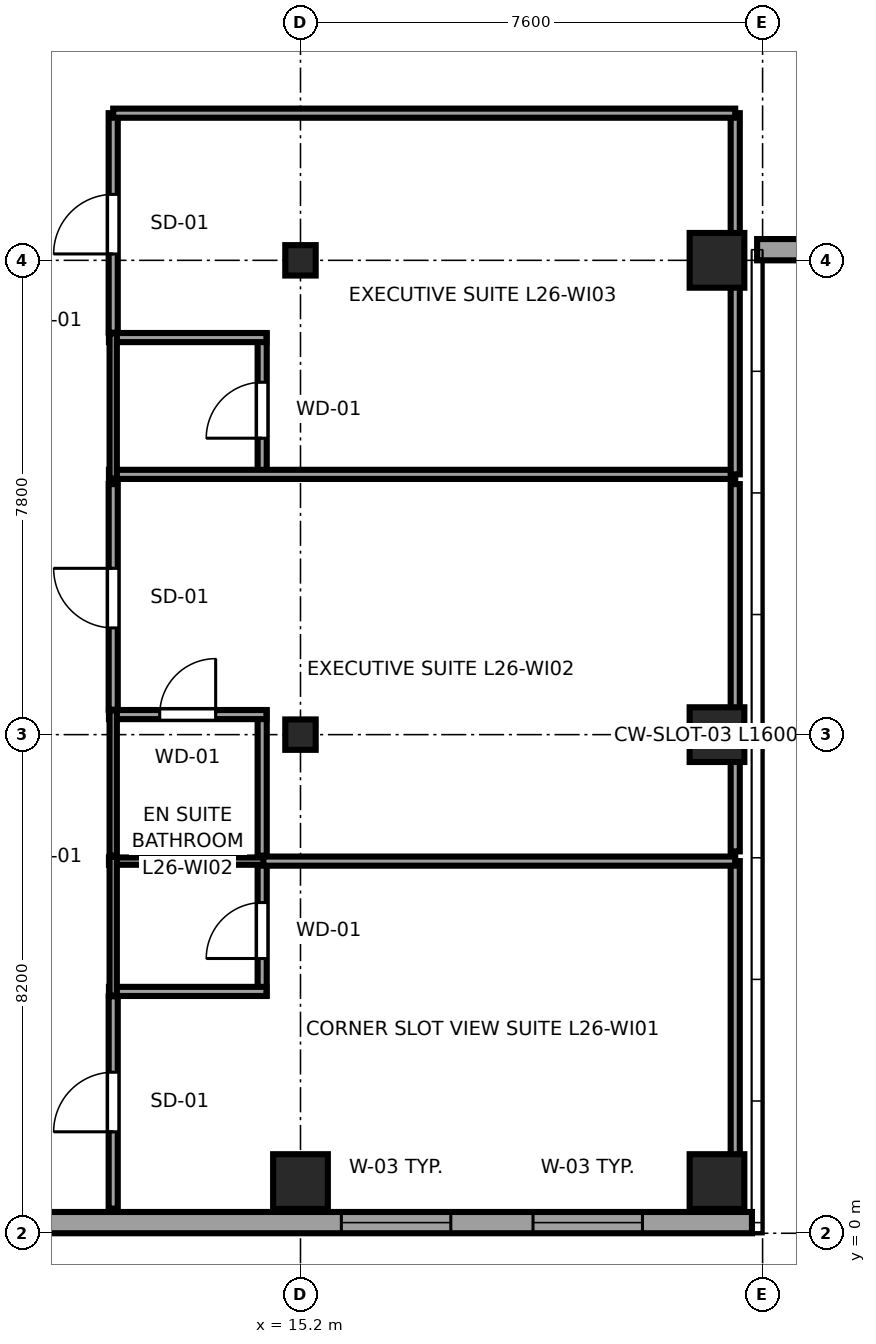
"""IFC4 building model, lengths in metres.
Left out: names, types, materials, properties, quantities, classifications, styles, units other than length and angle.
Written with IfcOpenShell. Run it as: python <this file> out.ifc"""

import sys

from ifc_helpers import new_model, si_unit, direction, frame, frame_2d, origin, origin_2d, place, context, subcontext, project, spatial, rectangle, i_section, extrude, source, transform, mapped, element, fill, save


model = new_model("IFC4")
c1 = context("Model", 3, precision=1e-05, world=origin(), true_north=direction((0.0, 1.0)))
c2 = subcontext(c1, "Body", "Model", "MODEL_VIEW")
j1 = project(units=[si_unit("LENGTHUNIT", "METRE"), si_unit("PLANEANGLEUNIT", "RADIAN")], contexts=[c1])
p1 = place(None, origin())
s1 = spatial("IfcSite", under=j1, at=p1, CompositionType="ELEMENT")
p2 = place(p1, origin())
s2 = spatial("IfcBuilding", under=s1, at=p2, CompositionType="ELEMENT")
p3 = place(p2, frame((0.0, 0.0, 104.45)))
s3 = spatial("IfcBuildingStorey", under=s2, at=p3, CompositionType="ELEMENT", Elevation=104.45)
m1 = source(origin(), c2, "Body", "SweptSolid", [
    extrude(rectangle(XDim=0.9, YDim=0.9, at=origin_2d()), origin(), (0.0, 0.0, 1.0), 3.55),
])
p4 = place(p3, frame((15.2, 0.85, 0.0), z_axis=(0.0, 0.0, 1.0), x_axis=(1.0, 0.0, 0.0)))
e1 = element("IfcColumn", 1, at=p4, inside=s3, PredefinedType="COLUMN", context=c2, shape_type="MappedRepresentation", body=[
    mapped(m1, transform((0.0, 0.0, 0.0), x_axis=(1.0, 0.0, 0.0), y_axis=(0.0, 1.0, 0.0), z_axis=(0.0, 0.0, 1.0), scale=1.0)),
])
m2 = source(origin(), c2, "Body", "SweptSolid", [
    extrude(i_section(OverallWidth=0.5, OverallDepth=0.5, WebThickness=0.022, FlangeThickness=0.034, at=origin_2d()), origin(), (0.0, 0.0, 1.0), 3.55),
])
for number, where, z_axis, x_axis in (
    (2, (15.2, 8.2, 0.0), (0.0, 0.0, 1.0), (1.0, 0.0, 0.0)),
    (3, (15.2, 16.0, 0.0), (0.0, 0.0, 1.0), (1.0, 0.0, 0.0)),
):
    element("IfcColumn", number, at=place(p3, frame(where, z_axis=z_axis, x_axis=x_axis)), inside=s3, PredefinedType="COLUMN", context=c2, shape_type="MappedRepresentation", body=[
        mapped(m2, transform((0.0, 0.0, 0.0), x_axis=(1.0, 0.0, 0.0), y_axis=(0.0, 1.0, 0.0), z_axis=(0.0, 0.0, 1.0), scale=1.0)),
    ])
for number, where, z_axis, x_axis in (
    (4, (22.05, 0.85, 0.0), (0.0, 0.0, 1.0), (1.0, 0.0, 0.0)),
    (5, (22.05, 8.2, 0.0), (0.0, 0.0, 1.0), (1.0, 0.0, 0.0)),
    (6, (22.05, 16.0, 0.0), (0.0, 0.0, 1.0), (1.0, 0.0, 0.0)),
):
    element("IfcColumn", number, at=place(p3, frame(where, z_axis=z_axis, x_axis=x_axis)), inside=s3, PredefinedType="COLUMN", context=c2, shape_type="MappedRepresentation", body=[
        mapped(m1, transform((0.0, 0.0, 0.0), x_axis=(1.0, 0.0, 0.0), y_axis=(0.0, 1.0, 0.0), z_axis=(0.0, 0.0, 1.0), scale=1.0)),
    ])
p5 = place(p3, frame((4.617, 0.175, 0.0), z_axis=(0.0, 0.0, 1.0), x_axis=(1.0, 0.0, 0.0)))
e7 = element("IfcWall", 7, at=p5, inside=s3, PredefinedType="SOLIDWALL", context=c2, shape_type="SweptSolid", body=[
    extrude(rectangle(XDim=18.008, YDim=0.35, at=frame_2d((9.004, 0.0))), origin(), (0.0, 0.0, 1.0), 3.37),
])
p6 = place(p5, frame((11.255, 0.0, 0.68)))
e8 = element("IfcOpeningElement", 8, at=p6, cuts=e7, PredefinedType="OPENING", context=c2, shape_type="SweptSolid", body=[
    extrude(rectangle(XDim=1.8, YDim=1.85, at=frame_2d((0.9, 0.925))), frame((0.0, 0.185, 0.0), z_axis=(0.0, -1.0, 0.0), x_axis=(1.0, 0.0, 0.0)), (0.0, 0.0, 1.0), 0.37),
])
p7 = place(p5, frame((14.407, 0.0, 0.68)))
e9 = element("IfcOpeningElement", 9, at=p7, cuts=e7, PredefinedType="OPENING", context=c2, shape_type="SweptSolid", body=[
    extrude(rectangle(XDim=1.8, YDim=1.85, at=frame_2d((0.9, 0.925))), frame((0.0, 0.185, 0.0), z_axis=(0.0, -1.0, 0.0), x_axis=(1.0, 0.0, 0.0)), (0.0, 0.0, 1.0), 0.37),
])
p8 = place(p3, frame((22.71, 16.175, 0.0), z_axis=(0.0, 0.0, 1.0), x_axis=(1.0, 0.0, 0.0)))
e10 = element("IfcWall", 10, at=p8, inside=s3, PredefinedType="SOLIDWALL", context=c2, shape_type="SweptSolid", body=[
    extrude(rectangle(XDim=11.58, YDim=0.35, at=frame_2d((5.79, 0.0))), origin(), (0.0, 0.0, 1.0), 2.748),
])
p9 = place(p8, frame((2.295, 0.0, 0.68)))
e11 = element("IfcOpeningElement", 11, at=p9, cuts=e10, PredefinedType="OPENING", context=c2, shape_type="SweptSolid", body=[
    extrude(rectangle(XDim=1.8, YDim=1.85, at=frame_2d((0.9, 0.925))), frame((0.0, 0.185, 0.0), z_axis=(0.0, -1.0, 0.0), x_axis=(1.0, 0.0, 0.0)), (0.0, 0.0, 1.0), 0.37),
])
p10 = place(p8, frame((7.485, 0.0, 0.68)))
e12 = element("IfcOpeningElement", 12, at=p10, cuts=e10, PredefinedType="OPENING", context=c2, shape_type="SweptSolid", body=[
    extrude(rectangle(XDim=1.8, YDim=1.85, at=frame_2d((0.9, 0.925))), frame((0.0, 0.185, 0.0), z_axis=(0.0, -1.0, 0.0), x_axis=(1.0, 0.0, 0.0)), (0.0, 0.0, 1.0), 0.37),
])
p11 = place(p3, frame((14.57, 3.907, 0.0), z_axis=(0.0, 0.0, 1.0), x_axis=(0.0, 1.0, 0.0)))
e13 = element("IfcWall", 13, at=p11, inside=s3, PredefinedType="PARTITIONING", context=c2, shape_type="SweptSolid", body=[
    extrude(rectangle(XDim=2.283, YDim=0.15, at=frame_2d((1.142, 0.0))), origin(), (0.0, 0.0, 1.0), 3.37),
])
p12 = place(p11, frame((0.612, 0.0, 0.0)))
e14 = element("IfcOpeningElement", 14, at=p12, cuts=e13, PredefinedType="OPENING", context=c2, shape_type="SweptSolid", body=[
    extrude(rectangle(XDim=0.92, YDim=2.01, at=frame_2d((0.46, 1.005))), frame((0.0, 0.085, 0.0), z_axis=(0.0, -1.0, 0.0), x_axis=(1.0, 0.0, 0.0)), (0.0, 0.0, 1.0), 0.17),
])
p13 = place(p3, frame((12.05, 3.977, 0.0), z_axis=(0.0, 0.0, 1.0), x_axis=(1.0, 0.0, 0.0)))
e15 = element("IfcWall", 15, at=p13, inside=s3, PredefinedType="PARTITIONING", context=c2, shape_type="SweptSolid", body=[
    extrude(rectangle(XDim=2.59, YDim=0.15, at=frame_2d((1.295, 0.0))), origin(), (0.0, 0.0, 1.0), 3.37),
])
p14 = place(p3, frame((12.05, 6.12, 0.0), z_axis=(0.0, 0.0, 1.0), x_axis=(1.0, 0.0, 0.0)))
e16 = element("IfcWall", 16, at=p14, inside=s3, PredefinedType="PLUMBINGWALL", context=c2, shape_type="SweptSolid", body=[
    extrude(rectangle(XDim=2.59, YDim=0.12, at=frame_2d((1.295, 0.0))), origin(), (0.0, 0.0, 1.0), 3.37),
])
p15 = place(p3, frame((12.12, 3.907, 0.0), z_axis=(0.0, 0.0, 1.0), x_axis=(0.0, 1.0, 0.0)))
e17 = element("IfcWall", 17, at=p15, inside=s3, PredefinedType="PLUMBINGWALL", context=c2, shape_type="SweptSolid", body=[
    extrude(rectangle(XDim=2.283, YDim=0.12, at=frame_2d((1.142, 0.0))), origin(), (0.0, 0.0, 1.0), 3.37),
])
p16 = place(p3, frame((14.57, 6.21, 0.0), z_axis=(0.0, 0.0, 1.0), x_axis=(0.0, 1.0, 0.0)))
e18 = element("IfcWall", 18, at=p16, inside=s3, PredefinedType="PARTITIONING", context=c2, shape_type="SweptSolid", body=[
    extrude(rectangle(XDim=2.39, YDim=0.15, at=frame_2d((1.195, 0.0))), origin(), (0.0, 0.0, 1.0), 3.37),
])
p17 = place(p3, frame((12.05, 8.53, 0.0), z_axis=(0.0, 0.0, 1.0), x_axis=(1.0, 0.0, 0.0)))
e19 = element("IfcWall", 19, at=p17, inside=s3, PredefinedType="PARTITIONING", context=c2, shape_type="SweptSolid", body=[
    extrude(rectangle(XDim=2.59, YDim=0.15, at=frame_2d((1.295, 0.0))), origin(), (0.0, 0.0, 1.0), 3.37),
])
p18 = place(p17, frame((0.835, 0.0, 0.0)))
e20 = element("IfcOpeningElement", 20, at=p18, cuts=e19, PredefinedType="OPENING", context=c2, shape_type="SweptSolid", body=[
    extrude(rectangle(XDim=0.92, YDim=2.01, at=frame_2d((0.46, 1.005))), frame((0.0, 0.085, 0.0), z_axis=(0.0, -1.0, 0.0), x_axis=(1.0, 0.0, 0.0)), (0.0, 0.0, 1.0), 0.17),
])
p19 = place(p3, frame((12.12, 6.21, 0.0), z_axis=(0.0, 0.0, 1.0), x_axis=(0.0, 1.0, 0.0)))
e21 = element("IfcWall", 21, at=p19, inside=s3, PredefinedType="PLUMBINGWALL", context=c2, shape_type="SweptSolid", body=[
    extrude(rectangle(XDim=2.39, YDim=0.12, at=frame_2d((1.195, 0.0))), origin(), (0.0, 0.0, 1.0), 3.37),
])
p20 = place(p3, frame((14.57, 12.41, 0.0), z_axis=(0.0, 0.0, 1.0), x_axis=(0.0, 1.0, 0.0)))
e22 = element("IfcWall", 22, at=p20, inside=s3, PredefinedType="PARTITIONING", context=c2, shape_type="SweptSolid", body=[
    extrude(rectangle(XDim=2.39, YDim=0.15, at=frame_2d((1.195, 0.0))), origin(), (0.0, 0.0, 1.0), 3.37),
])
p21 = place(p20, frame((0.665, 0.0, 0.0)))
e23 = element("IfcOpeningElement", 23, at=p21, cuts=e22, PredefinedType="OPENING", context=c2, shape_type="SweptSolid", body=[
    extrude(rectangle(XDim=0.92, YDim=2.01, at=frame_2d((0.46, 1.005))), frame((0.0, 0.085, 0.0), z_axis=(0.0, -1.0, 0.0), x_axis=(1.0, 0.0, 0.0)), (0.0, 0.0, 1.0), 0.17),
])
p22 = place(p3, frame((12.05, 12.48, 0.0), z_axis=(0.0, 0.0, 1.0), x_axis=(1.0, 0.0, 0.0)))
e24 = element("IfcWall", 24, at=p22, inside=s3, PredefinedType="PARTITIONING", context=c2, shape_type="SweptSolid", body=[
    extrude(rectangle(XDim=10.3, YDim=0.15, at=frame_2d((5.15, 0.0))), origin(), (0.0, 0.0, 1.0), 3.37),
])
p23 = place(p3, frame((12.05, 14.73, 0.0), z_axis=(0.0, 0.0, 1.0), x_axis=(1.0, 0.0, 0.0)))
e25 = element("IfcWall", 25, at=p23, inside=s3, PredefinedType="PARTITIONING", context=c2, shape_type="SweptSolid", body=[
    extrude(rectangle(XDim=2.59, YDim=0.15, at=frame_2d((1.295, 0.0))), origin(), (0.0, 0.0, 1.0), 3.37),
])
p24 = place(p3, frame((12.12, 12.41, 0.0), z_axis=(0.0, 0.0, 1.0), x_axis=(0.0, 1.0, 0.0)))
e26 = element("IfcWall", 26, at=p24, inside=s3, PredefinedType="PLUMBINGWALL", context=c2, shape_type="SweptSolid", body=[
    extrude(rectangle(XDim=2.39, YDim=0.12, at=frame_2d((1.195, 0.0))), origin(), (0.0, 0.0, 1.0), 3.37),
])
p25 = place(p3, frame((12.12, 0.405, 0.0), z_axis=(0.0, 0.0, 1.0), x_axis=(0.0, 1.0, 0.0)))
e27 = element("IfcWall", 27, at=p25, inside=s3, PredefinedType="PARTITIONING", context=c2, shape_type="SweptSolid", body=[
    extrude(rectangle(XDim=3.492, YDim=0.15, at=frame_2d((1.746, 0.0))), origin(), (0.0, 0.0, 1.0), 3.37),
])
p26 = place(p25, frame((1.263, 0.0, 0.0)))
e28 = element("IfcOpeningElement", 28, at=p26, cuts=e27, PredefinedType="OPENING", context=c2, shape_type="SweptSolid", body=[
    extrude(rectangle(XDim=0.98, YDim=2.12, at=frame_2d((0.49, 1.06))), frame((0.0, 0.085, 0.0), z_axis=(0.0, -1.0, 0.0), x_axis=(1.0, 0.0, 0.0)), (0.0, 0.0, 1.0), 0.17),
])
p27 = place(p3, frame((22.35, 0.405, 0.0), z_axis=(0.0, 0.0, 1.0), x_axis=(0.0, 1.0, 0.0)))
e29 = element("IfcWall", 29, at=p27, inside=s3, PredefinedType="PARTITIONING", context=c2, shape_type="SweptSolid", body=[
    extrude(rectangle(XDim=5.715, YDim=0.15, at=frame_2d((2.857, 0.0))), origin(), (0.0, 0.0, 1.0), 3.37),
])
p28 = place(p3, frame((14.59, 6.12, 0.0), z_axis=(0.0, 0.0, 1.0), x_axis=(1.0, 0.0, 0.0)))
e30 = element("IfcWall", 30, at=p28, inside=s3, PredefinedType="PARTITIONING", context=c2, shape_type="SweptSolid", body=[
    extrude(rectangle(XDim=7.76, YDim=0.15, at=frame_2d((3.88, 0.0))), origin(), (0.0, 0.0, 1.0), 3.37),
])
p29 = place(p3, frame((12.12, 8.61, 0.0), z_axis=(0.0, 0.0, 1.0), x_axis=(0.0, 1.0, 0.0)))
e31 = element("IfcWall", 31, at=p29, inside=s3, PredefinedType="PARTITIONING", context=c2, shape_type="SweptSolid", body=[
    extrude(rectangle(XDim=3.71, YDim=0.15, at=frame_2d((1.855, 0.0))), origin(), (0.0, 0.0, 1.0), 3.37),
])
p30 = place(p29, frame((1.345, 0.0, 0.0)))
e32 = element("IfcOpeningElement", 32, at=p30, cuts=e31, PredefinedType="OPENING", context=c2, shape_type="SweptSolid", body=[
    extrude(rectangle(XDim=0.98, YDim=2.12, at=frame_2d((0.49, 1.06))), frame((0.0, 0.085, 0.0), z_axis=(0.0, -1.0, 0.0), x_axis=(1.0, 0.0, 0.0)), (0.0, 0.0, 1.0), 0.17),
])
p31 = place(p3, frame((22.35, 6.28, 0.0), z_axis=(0.0, 0.0, 1.0), x_axis=(0.0, 1.0, 0.0)))
e33 = element("IfcWall", 33, at=p31, inside=s3, PredefinedType="PARTITIONING", context=c2, shape_type="SweptSolid", body=[
    extrude(rectangle(XDim=6.04, YDim=0.15, at=frame_2d((3.02, 0.0))), origin(), (0.0, 0.0, 1.0), 3.37),
])
p32 = place(p3, frame((12.12, 14.81, 0.0), z_axis=(0.0, 0.0, 1.0), x_axis=(0.0, 1.0, 0.0)))
e34 = element("IfcWall", 34, at=p32, inside=s3, PredefinedType="PARTITIONING", context=c2, shape_type="SweptSolid", body=[
    extrude(rectangle(XDim=3.61, YDim=0.15, at=frame_2d((1.805, 0.0))), origin(), (0.0, 0.0, 1.0), 3.37),
])
p33 = place(p32, frame((1.295, 0.0, 0.0)))
e35 = element("IfcOpeningElement", 35, at=p33, cuts=e34, PredefinedType="OPENING", context=c2, shape_type="SweptSolid", body=[
    extrude(rectangle(XDim=0.98, YDim=2.12, at=frame_2d((0.49, 1.06))), frame((0.0, 0.085, 0.0), z_axis=(0.0, -1.0, 0.0), x_axis=(1.0, 0.0, 0.0)), (0.0, 0.0, 1.0), 0.17),
])
p34 = place(p3, frame((22.35, 12.48, 0.0), z_axis=(0.0, 0.0, 1.0), x_axis=(0.0, 1.0, 0.0)))
e36 = element("IfcWall", 36, at=p34, inside=s3, PredefinedType="PARTITIONING", context=c2, shape_type="SweptSolid", body=[
    extrude(rectangle(XDim=5.94, YDim=0.15, at=frame_2d((2.97, 0.0))), origin(), (0.0, 0.0, 1.0), 3.37),
])
p35 = place(p3, frame((12.12, 18.42, 0.0), z_axis=(0.0, 0.0, 1.0), x_axis=(1.0, 0.0, 0.0)))
e37 = element("IfcWall", 37, at=p35, inside=s3, PredefinedType="PARTITIONING", context=c2, shape_type="SweptSolid", body=[
    extrude(rectangle(XDim=10.23, YDim=0.15, at=frame_2d((5.115, 0.0))), origin(), (0.0, 0.0, 1.0), 3.37),
])
m3 = source(origin(), c2, "Body", "SweptSolid", [
    extrude(rectangle(XDim=1.8, YDim=1.85, at=frame_2d((0.9, 0.925))), frame((0.0, 0.09, 0.0), z_axis=(0.0, -1.0, 0.0), x_axis=(1.0, 0.0, 0.0)), (0.0, 0.0, 1.0), 0.06),
])
p36 = place(p6, origin())
e38 = element("IfcWindow", 38, at=p36, inside=s3, PartitioningType="TRIPLE_PANEL_HORIZONTAL", PredefinedType="WINDOW", context=c2, shape_type="MappedRepresentation", body=[
    mapped(m3, transform((0.0, 0.0, 0.0), x_axis=(1.0, 0.0, 0.0), y_axis=(0.0, 1.0, 0.0), z_axis=(0.0, 0.0, 1.0), scale=1.0)),
])
fill(e8, e38)
p37 = place(p7, origin())
e39 = element("IfcWindow", 39, at=p37, inside=s3, PartitioningType="TRIPLE_PANEL_HORIZONTAL", PredefinedType="WINDOW", context=c2, shape_type="MappedRepresentation", body=[
    mapped(m3, transform((0.0, 0.0, 0.0), x_axis=(1.0, 0.0, 0.0), y_axis=(0.0, 1.0, 0.0), z_axis=(0.0, 0.0, 1.0), scale=1.0)),
])
fill(e9, e39)
m4 = source(origin(), c2, "Body", "SweptSolid", [
    extrude(rectangle(XDim=0.92, YDim=2.01, at=frame_2d((0.46, 1.005))), frame((0.0, 0.025, 0.0), z_axis=(0.0, -1.0, 0.0), x_axis=(1.0, 0.0, 0.0)), (0.0, 0.0, 1.0), 0.05),
])
p38 = place(p12, origin())
e40 = element("IfcDoor", 40, at=p38, inside=s3, OperationType="SINGLE_SWING_LEFT", PredefinedType="DOOR", context=c2, shape_type="MappedRepresentation", body=[
    mapped(m4, transform((0.0, 0.0, 0.0), x_axis=(1.0, 0.0, 0.0), y_axis=(0.0, 1.0, 0.0), z_axis=(0.0, 0.0, 1.0), scale=1.0)),
])
fill(e14, e40)
p39 = place(p18, origin())
e41 = element("IfcDoor", 41, at=p39, inside=s3, OperationType="SINGLE_SWING_RIGHT", PredefinedType="DOOR", context=c2, shape_type="MappedRepresentation", body=[
    mapped(m4, transform((0.0, 0.0, 0.0), x_axis=(1.0, 0.0, 0.0), y_axis=(0.0, 1.0, 0.0), z_axis=(0.0, 0.0, 1.0), scale=1.0)),
])
fill(e20, e41)
p40 = place(p21, origin())
e42 = element("IfcDoor", 42, at=p40, inside=s3, OperationType="SINGLE_SWING_LEFT", PredefinedType="DOOR", context=c2, shape_type="MappedRepresentation", body=[
    mapped(m4, transform((0.0, 0.0, 0.0), x_axis=(1.0, 0.0, 0.0), y_axis=(0.0, 1.0, 0.0), z_axis=(0.0, 0.0, 1.0), scale=1.0)),
])
fill(e23, e42)
m5 = source(origin(), c2, "Body", "SweptSolid", [
    extrude(rectangle(XDim=0.98, YDim=2.12, at=frame_2d((0.49, 1.06))), frame((0.0, 0.025, 0.0), z_axis=(0.0, -1.0, 0.0), x_axis=(1.0, 0.0, 0.0)), (0.0, 0.0, 1.0), 0.05),
])
p41 = place(p26, origin())
e43 = element("IfcDoor", 43, at=p41, inside=s3, OperationType="SINGLE_SWING_LEFT", PredefinedType="DOOR", context=c2, shape_type="MappedRepresentation", body=[
    mapped(m5, transform((0.0, 0.0, 0.0), x_axis=(1.0, 0.0, 0.0), y_axis=(0.0, 1.0, 0.0), z_axis=(0.0, 0.0, 1.0), scale=1.0)),
])
fill(e28, e43)
p42 = place(p30, origin())
e44 = element("IfcDoor", 44, at=p42, inside=s3, OperationType="SINGLE_SWING_RIGHT", PredefinedType="DOOR", context=c2, shape_type="MappedRepresentation", body=[
    mapped(m5, transform((0.0, 0.0, 0.0), x_axis=(1.0, 0.0, 0.0), y_axis=(0.0, 1.0, 0.0), z_axis=(0.0, 0.0, 1.0), scale=1.0)),
])
fill(e32, e44)
p43 = place(p33, origin())
e45 = element("IfcDoor", 45, at=p43, inside=s3, OperationType="SINGLE_SWING_LEFT", PredefinedType="DOOR", context=c2, shape_type="MappedRepresentation", body=[
    mapped(m5, transform((0.0, 0.0, 0.0), x_axis=(1.0, 0.0, 0.0), y_axis=(0.0, 1.0, 0.0), z_axis=(0.0, 0.0, 1.0), scale=1.0)),
])
fill(e35, e45)
save(model, sys.argv[1])
